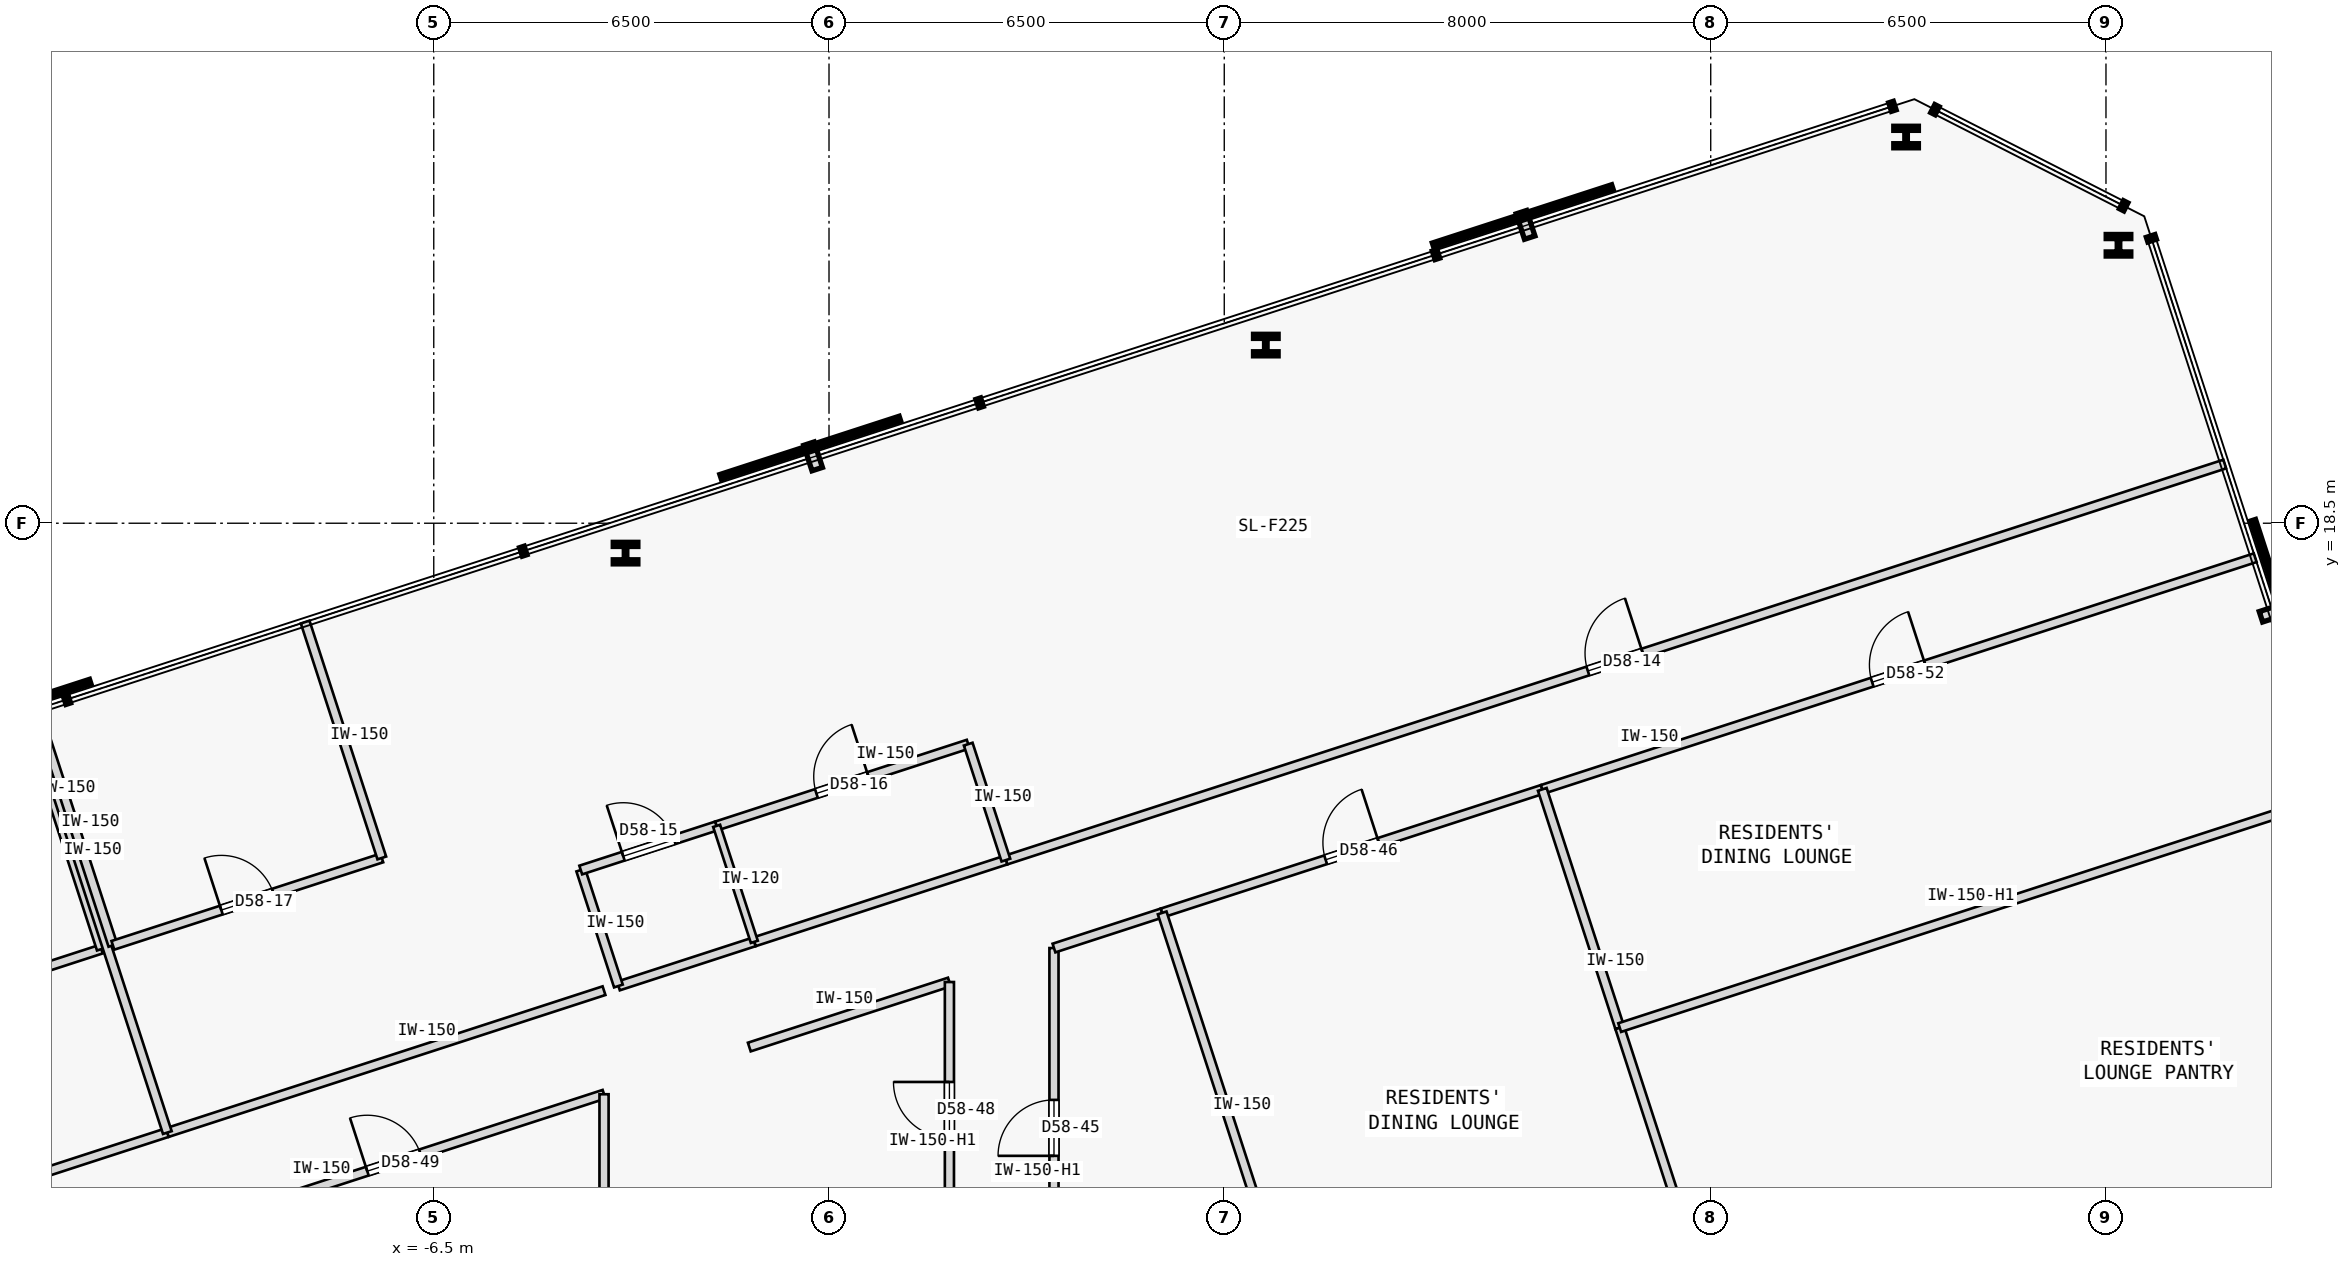
"""IFC4 building model, lengths in metres.
Left out: names, types, materials, properties, quantities, classifications, styles, units other than length and angle.
Written with IfcOpenShell. Run it as: python <this file> out.ifc"""

import sys

from ifc_helpers import new_model, si_unit, direction, frame, frame_2d, origin, origin_2d, place, context, subcontext, project, spatial, rectangle, i_section, extrude, element, fill, save


model = new_model("IFC4")
c1 = context("Model", 3, precision=1e-05, world=origin(), true_north=direction((0.0, 1.0)))
c2 = subcontext(c1, "Body", "Model", "MODEL_VIEW")
j1 = project(units=[si_unit("LENGTHUNIT", "METRE"), si_unit("PLANEANGLEUNIT", "RADIAN")], contexts=[c1])
p1 = place(None, origin())
s1 = spatial("IfcSite", under=j1, at=p1, CompositionType="ELEMENT")
p2 = place(p1, origin())
s2 = spatial("IfcBuilding", under=s1, at=p2, CompositionType="ELEMENT")
p3 = place(p2, frame((0.0, 0.0, 220.95)))
s3 = spatial("IfcBuildingStorey", under=s2, at=p3, CompositionType="ELEMENT", Elevation=220.95)
for number, where, z_axis, x_axis in (
    (1, (21.206, 23.071, 0.0), (0.0, 0.0, 1.0), (1.0, 0.0, 0.0)),
    (2, (17.713, 24.851, 0.0), (0.0, 0.0, 1.0), (1.0, 0.0, 0.0)),
    (3, (7.184, 21.43, 0.0), (0.0, 0.0, 1.0), (1.0, 0.0, 0.0)),
    (4, (-3.346, 18.009, 0.0), (0.0, 0.0, 1.0), (1.0, 0.0, 0.0)),
):
    element("IfcColumn", number, at=place(p3, frame(where, z_axis=z_axis, x_axis=x_axis)), inside=s3, PredefinedType="COLUMN", context=c2, shape_type="SweptSolid", body=[
        extrude(i_section(OverallWidth=0.405, OverallDepth=0.355, WebThickness=0.042, FlangeThickness=0.068, FilletRadius=0.015, at=origin_2d()), origin(), (0.0, 0.0, 1.0), 3.35),
    ])
p4 = place(p3, frame((-24.022, 4.21, 0.0), z_axis=(0.0, 0.0, 1.0), x_axis=(0.951058997127, 0.309009359055, 0.0)))
e5 = element("IfcWall", 5, at=p4, inside=s3, PredefinedType="PARTITIONING", context=c2, shape_type="SweptSolid", body=[
    extrude(rectangle(XDim=13.817, YDim=0.15, at=frame_2d((6.908, 0.0))), origin(), (0.0, 0.0, 1.0), 3.125),
])
p5 = place(p4, frame((6.434, 0.0, 0.0)))
e6 = element("IfcOpeningElement", 6, at=p5, cuts=e5, PredefinedType="OPENING", context=c2, shape_type="SweptSolid", body=[
    extrude(rectangle(XDim=0.95, YDim=2.15, at=frame_2d((0.475, 1.075))), frame((0.0, 0.085, 0.0), z_axis=(0.0, -1.0, 0.0), x_axis=(1.0, 0.0, 0.0)), (0.0, 0.0, 1.0), 0.17),
])
p6 = place(p3, frame((-10.882, 8.479, 0.0), z_axis=(0.0, 0.0, 1.0), x_axis=(0.951051887333, 0.309031240494, 0.0)))
e7 = element("IfcWall", 7, at=p6, inside=s3, PredefinedType="PARTITIONING", context=c2, shape_type="SweptSolid", body=[
    extrude(rectangle(XDim=7.551, YDim=0.15, at=frame_2d((3.775, 0.0))), origin(), (0.0, 0.0, 1.0), 3.125),
])
p7 = place(p3, frame((2.909, 12.96, 0.0), z_axis=(0.0, 0.0, 1.0), x_axis=(0.951056113966, 0.309018232614, 0.0)))
e8 = element("IfcWall", 8, at=p7, inside=s3, PredefinedType="PARTITIONING", context=c2, shape_type="SweptSolid", body=[
    extrude(rectangle(XDim=21.076, YDim=0.15, at=frame_2d((10.538, 0.0))), origin(), (0.0, 0.0, 1.0), 3.125),
])
p8 = place(p7, frame((10.063, 0.0, 0.0)))
e9 = element("IfcOpeningElement", 9, at=p8, cuts=e8, PredefinedType="OPENING", context=c2, shape_type="SweptSolid", body=[
    extrude(rectangle(XDim=0.95, YDim=2.15, at=frame_2d((0.475, 1.075))), frame((0.0, 0.085, 0.0), z_axis=(0.0, -1.0, 0.0), x_axis=(1.0, 0.0, 0.0)), (0.0, 0.0, 1.0), 0.17),
])
p9 = place(p3, frame((-3.463, 10.89, 0.0), z_axis=(0.0, 0.0, 1.0), x_axis=(0.951045519245, 0.309050837767, 0.0)))
e10 = element("IfcWall", 10, at=p9, inside=s3, PredefinedType="PARTITIONING", context=c2, shape_type="SweptSolid", body=[
    extrude(rectangle(XDim=2.35, YDim=0.15, at=frame_2d((1.175, 0.0))), origin(), (0.0, 0.0, 1.0), 3.125),
])
p10 = place(p3, frame((-1.228, 11.616, 0.0), z_axis=(0.0, 0.0, 1.0), x_axis=(0.951069122051, 0.308978195154, 0.0)))
e11 = element("IfcWall", 11, at=p10, inside=s3, PredefinedType="PARTITIONING", context=c2, shape_type="SweptSolid", body=[
    extrude(rectangle(XDim=4.35, YDim=0.15, at=frame_2d((2.175, 0.0))), origin(), (0.0, 0.0, 1.0), 3.125),
])
p11 = place(p3, frame((3.7, 5.6, 0.0), z_axis=(0.0, 0.0, 1.0), x_axis=(-0.000123839008, 0.999999992332, 0.0)))
e12 = element("IfcWall", 12, at=p11, inside=s3, PredefinedType="PARTITIONING", context=c2, shape_type="SweptSolid", body=[
    extrude(rectangle(XDim=5.914, YDim=0.15, at=frame_2d((2.957, 0.0))), origin(), (0.0, 0.0, 1.0), 2.675),
])
p12 = place(p11, frame((2.497, 0.0, 0.0)))
e13 = element("IfcOpeningElement", 13, at=p12, cuts=e12, PredefinedType="OPENING", context=c2, shape_type="SweptSolid", body=[
    extrude(rectangle(XDim=0.92, YDim=2.15, at=frame_2d((0.46, 1.075))), frame((0.0, 0.085, 0.0), z_axis=(0.0, -1.0, 0.0), x_axis=(1.0, 0.0, 0.0)), (0.0, 0.0, 1.0), 0.17),
])
p13 = place(p3, frame((3.699, 11.514, 0.0), z_axis=(0.0, 0.0, 1.0), x_axis=(0.951069540665, 0.308976906612, 0.0)))
e14 = element("IfcWall", 14, at=p13, inside=s3, PredefinedType="PARTITIONING", context=c2, shape_type="SweptSolid", body=[
    extrude(rectangle(XDim=1.871, YDim=0.15, at=frame_2d((0.936, 0.0))), origin(), (0.0, 0.0, 1.0), 3.125),
])
p14 = place(p3, frame((5.479, 12.092, 0.0), z_axis=(0.0, 0.0, 1.0), x_axis=(0.951051809397, 0.309031480343, 0.0)))
e15 = element("IfcWall", 15, at=p14, inside=s3, PredefinedType="PARTITIONING", context=c2, shape_type="SweptSolid", body=[
    extrude(rectangle(XDim=6.573, YDim=0.15, at=frame_2d((3.287, 0.0))), origin(), (0.0, 0.0, 1.0), 3.125),
])
p15 = place(p14, frame((2.826, 0.0, 0.0)))
e16 = element("IfcOpeningElement", 16, at=p15, cuts=e15, PredefinedType="OPENING", context=c2, shape_type="SweptSolid", body=[
    extrude(rectangle(XDim=0.92, YDim=2.15, at=frame_2d((0.46, 1.075))), frame((0.0, 0.085, 0.0), z_axis=(0.0, -1.0, 0.0), x_axis=(1.0, 0.0, 0.0)), (0.0, 0.0, 1.0), 0.17),
])
p16 = place(p3, frame((-1.311, 9.886, 0.0), z_axis=(0.0, 0.0, 1.0), x_axis=(0.951068803905, 0.308979174442, 0.0)))
e17 = element("IfcWall", 17, at=p16, inside=s3, PredefinedType="PARTITIONING", context=c2, shape_type="SweptSolid", body=[
    extrude(rectangle(XDim=3.46, YDim=0.15, at=frame_2d((1.73, 0.0))), origin(), (0.0, 0.0, 1.0), 3.125),
])
p17 = place(p3, frame((1.98, 6.748, 0.0), z_axis=(0.0, 0.0, 1.0), x_axis=(0.0, 1.0, 0.0)))
e18 = element("IfcWall", 18, at=p17, inside=s3, PredefinedType="PARTITIONING", context=c2, shape_type="SweptSolid", body=[
    extrude(rectangle(XDim=4.207, YDim=0.15, at=frame_2d((2.104, 0.0))), origin(), (0.0, 0.0, 1.0), 2.675),
])
p18 = place(p17, frame((1.643, 0.0, 0.0)))
e19 = element("IfcOpeningElement", 19, at=p18, cuts=e18, PredefinedType="OPENING", context=c2, shape_type="SweptSolid", body=[
    extrude(rectangle(XDim=0.92, YDim=2.15, at=frame_2d((0.46, 1.075))), frame((0.0, 0.085, 0.0), z_axis=(0.0, -1.0, 0.0), x_axis=(1.0, 0.0, 0.0)), (0.0, 0.0, 1.0), 0.17),
])
p19 = place(p3, frame((-10.612, 6.864, 0.0), z_axis=(0.0, 0.0, 1.0), x_axis=(0.951060972078, 0.309003280548, 0.0)))
e20 = element("IfcWall", 20, at=p19, inside=s3, PredefinedType="PARTITIONING", context=c2, shape_type="SweptSolid", body=[
    extrude(rectangle(XDim=7.268, YDim=0.15, at=frame_2d((3.634, 0.0))), origin(), (0.0, 0.0, 1.0), 3.125),
])
p20 = place(p19, frame((3.174, 0.0, 0.0)))
e21 = element("IfcOpeningElement", 21, at=p20, cuts=e20, PredefinedType="OPENING", context=c2, shape_type="SweptSolid", body=[
    extrude(rectangle(XDim=0.92, YDim=2.15, at=frame_2d((0.46, 1.075))), frame((0.0, 0.085, 0.0), z_axis=(0.0, -1.0, 0.0), x_axis=(1.0, 0.0, 0.0)), (0.0, 0.0, 1.0), 0.17),
])
p21 = place(p3, frame((-3.7, 5.6, 0.0), z_axis=(0.0, 0.0, 1.0), x_axis=(0.000139120755, 0.999999990323, 0.0)))
e22 = element("IfcWall", 22, at=p21, inside=s3, PredefinedType="PARTITIONING", context=c2, shape_type="SweptSolid", body=[
    extrude(rectangle(XDim=3.51, YDim=0.15, at=frame_2d((1.755, 0.0))), origin(), (0.0, 0.0, 1.0), 3.125),
])
p22 = place(p3, frame((11.73, 14.123, 0.0), z_axis=(0.0, 0.0, 1.0), x_axis=(0.951060263663, 0.309005460926, 0.0)))
e23 = element("IfcWall", 23, at=p22, inside=s3, PredefinedType="PARTITIONING", context=c2, shape_type="SweptSolid", body=[
    extrude(rectangle(XDim=12.327, YDim=0.15, at=frame_2d((6.164, 0.0))), origin(), (0.0, 0.0, 1.0), 3.125),
])
p23 = place(p22, frame((5.704, 0.0, 0.0)))
e24 = element("IfcOpeningElement", 24, at=p23, cuts=e23, PredefinedType="OPENING", context=c2, shape_type="SweptSolid", body=[
    extrude(rectangle(XDim=0.92, YDim=2.15, at=frame_2d((0.46, 1.075))), frame((0.0, 0.085, 0.0), z_axis=(0.0, -1.0, 0.0), x_axis=(1.0, 0.0, 0.0)), (0.0, 0.0, 1.0), 0.17),
])
p24 = place(p3, frame((-16.389, 10.06, 0.0), z_axis=(0.0, 0.0, 1.0), x_axis=(0.951050272606, 0.309036209813, 0.0)))
e25 = element("IfcWall", 25, at=p24, inside=s3, PredefinedType="PARTITIONING", context=c2, shape_type="SweptSolid", body=[
    extrude(rectangle(XDim=4.65, YDim=0.15, at=frame_2d((2.325, 0.0))), origin(), (0.0, 0.0, 1.0), 3.125),
])
p25 = place(p24, frame((1.875, 0.0, 0.0)))
e26 = element("IfcOpeningElement", 26, at=p25, cuts=e25, PredefinedType="OPENING", context=c2, shape_type="SweptSolid", body=[
    extrude(rectangle(XDim=0.9, YDim=2.15, at=frame_2d((0.45, 1.075))), frame((0.0, 0.085, 0.0), z_axis=(0.0, -1.0, 0.0), x_axis=(1.0, 0.0, 0.0)), (0.0, 0.0, 1.0), 0.17),
])
p26 = place(p3, frame((-11.967, 11.497, 0.0), z_axis=(0.0, 0.0, 1.0), x_axis=(-0.309018403393, 0.951056058476, 0.0)))
e27 = element("IfcWall", 27, at=p26, inside=s3, PredefinedType="PARTITIONING", context=c2, shape_type="SweptSolid", body=[
    extrude(rectangle(XDim=4.079, YDim=0.15, at=frame_2d((2.04, 0.0))), origin(), (0.0, 0.0, 1.0), 3.125),
])
p27 = place(p3, frame((-10.882, 8.479, 0.0), z_axis=(0.0, 0.0, 1.0), x_axis=(-0.308998913866, 0.951062390819, 0.0)))
e28 = element("IfcWall", 28, at=p27, inside=s3, PredefinedType="PARTITIONING", context=c2, shape_type="SweptSolid", body=[
    extrude(rectangle(XDim=7.284, YDim=0.15, at=frame_2d((3.642, 0.0))), origin(), (0.0, 0.0, 1.0), 3.125),
])
p28 = place(p3, frame((-3.463, 10.89, 0.0), z_axis=(0.0, 0.0, 1.0), x_axis=(-0.308912611775, 0.951090425925, 0.0)))
e29 = element("IfcWall", 29, at=p28, inside=s3, PredefinedType="PARTITIONING", context=c2, shape_type="SweptSolid", body=[
    extrude(rectangle(XDim=2.005, YDim=0.15, at=frame_2d((1.002, 0.0))), origin(), (0.0, 0.0, 1.0), 3.125),
])
p29 = place(p3, frame((-4.083, 12.797, 0.0), z_axis=(0.0, 0.0, 1.0), x_axis=(0.951066131077, 0.308987401554, 0.0)))
e30 = element("IfcWall", 30, at=p29, inside=s3, PredefinedType="PARTITIONING", context=c2, shape_type="SweptSolid", body=[
    extrude(rectangle(XDim=2.35, YDim=0.15, at=frame_2d((1.175, 0.0))), origin(), (0.0, 0.0, 1.0), 3.125),
])
p30 = place(p29, frame((0.735, 0.0, 0.0)))
e31 = element("IfcOpeningElement", 31, at=p30, cuts=e30, PredefinedType="OPENING", context=c2, shape_type="SweptSolid", body=[
    extrude(rectangle(XDim=0.88, YDim=2.15, at=frame_2d((0.44, 1.075))), frame((0.0, 0.085, 0.0), z_axis=(0.0, -1.0, 0.0), x_axis=(1.0, 0.0, 0.0)), (0.0, 0.0, 1.0), 0.17),
])
p31 = place(p3, frame((-1.848, 13.523, 0.0), z_axis=(0.0, 0.0, 1.0), x_axis=(0.951057987102, 0.309012467661, 0.0)))
e32 = element("IfcWall", 32, at=p31, inside=s3, PredefinedType="PARTITIONING", context=c2, shape_type="SweptSolid", body=[
    extrude(rectangle(XDim=4.35, YDim=0.15, at=frame_2d((2.175, 0.0))), origin(), (0.0, 0.0, 1.0), 3.125),
])
p32 = place(p31, frame((1.725, 0.0, 0.0)))
e33 = element("IfcOpeningElement", 33, at=p32, cuts=e32, PredefinedType="OPENING", context=c2, shape_type="SweptSolid", body=[
    extrude(rectangle(XDim=0.9, YDim=2.15, at=frame_2d((0.45, 1.075))), frame((0.0, 0.085, 0.0), z_axis=(0.0, -1.0, 0.0), x_axis=(1.0, 0.0, 0.0)), (0.0, 0.0, 1.0), 0.17),
])
p33 = place(p3, frame((2.909, 12.96, 0.0), z_axis=(0.0, 0.0, 1.0), x_axis=(-0.308912611775, 0.951090425925, 0.0)))
e34 = element("IfcWall", 34, at=p33, inside=s3, PredefinedType="PARTITIONING", context=c2, shape_type="SweptSolid", body=[
    extrude(rectangle(XDim=2.005, YDim=0.15, at=frame_2d((1.002, 0.0))), origin(), (0.0, 0.0, 1.0), 3.125),
])
p34 = place(p3, frame((-11.777, 11.559, 0.0), z_axis=(0.0, 0.0, 1.0), x_axis=(-0.309018403393, 0.951056058476, 0.0)))
e35 = element("IfcWall", 35, at=p34, inside=s3, PredefinedType="PARTITIONING", context=c2, shape_type="SweptSolid", body=[
    extrude(rectangle(XDim=4.079, YDim=0.15, at=frame_2d((2.04, 0.0))), origin(), (0.0, 0.0, 1.0), 3.125),
])
p35 = place(p3, frame((-11.777, 11.559, 0.0), z_axis=(0.0, 0.0, 1.0), x_axis=(0.951050272606, 0.309036209813, 0.0)))
e36 = element("IfcWall", 36, at=p35, inside=s3, PredefinedType="PARTITIONING", context=c2, shape_type="SweptSolid", body=[
    extrude(rectangle(XDim=4.65, YDim=0.15, at=frame_2d((2.325, 0.0))), origin(), (0.0, 0.0, 1.0), 3.125),
])
p36 = place(p35, frame((1.875, 0.0, 0.0)))
e37 = element("IfcOpeningElement", 37, at=p36, cuts=e36, PredefinedType="OPENING", context=c2, shape_type="SweptSolid", body=[
    extrude(rectangle(XDim=0.9, YDim=2.15, at=frame_2d((0.45, 1.075))), frame((0.0, 0.085, 0.0), z_axis=(0.0, -1.0, 0.0), x_axis=(1.0, 0.0, 0.0)), (0.0, 0.0, 1.0), 0.17),
])
p37 = place(p3, frame((-7.354, 12.996, 0.0), z_axis=(0.0, 0.0, 1.0), x_axis=(-0.309018403393, 0.951056058476, 0.0)))
e38 = element("IfcWall", 38, at=p37, inside=s3, PredefinedType="PARTITIONING", context=c2, shape_type="SweptSolid", body=[
    extrude(rectangle(XDim=4.079, YDim=0.15, at=frame_2d((2.04, 0.0))), origin(), (0.0, 0.0, 1.0), 3.125),
])
p38 = place(p3, frame((-1.228, 11.616, 0.0), z_axis=(0.0, 0.0, 1.0), x_axis=(-0.309058537449, 0.951043017129, 0.0)))
e39 = element("IfcWall", 39, at=p38, inside=s3, PredefinedType="PARTITIONING", context=c2, shape_type="SweptSolid", body=[
    extrude(rectangle(XDim=2.005, YDim=0.12, at=frame_2d((1.002, 0.0))), origin(), (0.0, 0.0, 1.0), 3.125),
])
p39 = place(p3, frame((7.588, 5.6, 0.0), z_axis=(0.0, 0.0, 1.0), x_axis=(-0.309018946982, 0.951055881852, 0.0)))
e40 = element("IfcWall", 40, at=p39, inside=s3, PredefinedType="PARTITIONING", context=c2, shape_type="SweptSolid", body=[
    extrude(rectangle(XDim=6.826, YDim=0.15, at=frame_2d((3.413, 0.0))), origin(), (0.0, 0.0, 1.0), 3.125),
])
p40 = place(p3, frame((14.5, 5.6, 0.0), z_axis=(0.0, 0.0, 1.0), x_axis=(-0.308974360462, 0.951070367837, 0.0)))
e41 = element("IfcWall", 41, at=p40, inside=s3, PredefinedType="PARTITIONING", context=c2, shape_type="SweptSolid", body=[
    extrude(rectangle(XDim=4.843, YDim=0.15, at=frame_2d((2.421, 0.0))), origin(), (0.0, 0.0, 1.0), 3.125),
])
p41 = place(p3, frame((13.003, 10.206, 0.0), z_axis=(0.0, 0.0, 1.0), x_axis=(-0.309035144366, 0.951050618814, 0.0)))
e42 = element("IfcWall", 42, at=p41, inside=s3, PredefinedType="PARTITIONING", context=c2, shape_type="SweptSolid", body=[
    extrude(rectangle(XDim=4.119, YDim=0.15, at=frame_2d((2.06, 0.0))), origin(), (0.0, 0.0, 1.0), 3.125),
])
p42 = place(p3, frame((13.003, 10.206, 0.0), z_axis=(0.0, 0.0, 1.0), x_axis=(0.951060263663, 0.309005460926, 0.0)))
e43 = element("IfcWall", 43, at=p42, inside=s3, PredefinedType="PARTITIONING", context=c2, shape_type="SweptSolid", body=[
    extrude(rectangle(XDim=12.327, YDim=0.15, at=frame_2d((6.164, 0.0))), origin(), (0.0, 0.0, 1.0), 2.675),
])
p43 = place(p8, origin())
e44 = element("IfcDoor", 44, at=p43, inside=s3, OperationType="SINGLE_SWING_RIGHT", PredefinedType="DOOR", context=c2, shape_type="SweptSolid", body=[
    extrude(rectangle(XDim=0.95, YDim=2.15, at=frame_2d((0.475, 1.075))), frame((0.0, 0.025, 0.0), z_axis=(0.0, -1.0, 0.0), x_axis=(1.0, 0.0, 0.0)), (0.0, 0.0, 1.0), 0.05),
])
fill(e9, e44)
p44 = place(p30, origin())
e45 = element("IfcDoor", 45, at=p44, inside=s3, OperationType="SINGLE_SWING_LEFT", PredefinedType="DOOR", context=c2, shape_type="SweptSolid", body=[
    extrude(rectangle(XDim=0.88, YDim=2.15, at=frame_2d((0.44, 1.075))), frame((0.0, 0.025, 0.0), z_axis=(0.0, -1.0, 0.0), x_axis=(1.0, 0.0, 0.0)), (0.0, 0.0, 1.0), 0.05),
])
fill(e31, e45)
p45 = place(p32, origin())
e46 = element("IfcDoor", 46, at=p45, inside=s3, OperationType="SINGLE_SWING_RIGHT", PredefinedType="DOOR", context=c2, shape_type="SweptSolid", body=[
    extrude(rectangle(XDim=0.9, YDim=2.15, at=frame_2d((0.45, 1.075))), frame((0.0, 0.025, 0.0), z_axis=(0.0, -1.0, 0.0), x_axis=(1.0, 0.0, 0.0)), (0.0, 0.0, 1.0), 0.05),
])
fill(e33, e46)
p46 = place(p36, origin())
e47 = element("IfcDoor", 47, at=p46, inside=s3, OperationType="SINGLE_SWING_LEFT", PredefinedType="DOOR", context=c2, shape_type="SweptSolid", body=[
    extrude(rectangle(XDim=0.9, YDim=2.15, at=frame_2d((0.45, 1.075))), frame((0.0, 0.025, 0.0), z_axis=(0.0, -1.0, 0.0), x_axis=(1.0, 0.0, 0.0)), (0.0, 0.0, 1.0), 0.05),
])
fill(e37, e47)
p47 = place(p12, origin())
e48 = element("IfcDoor", 48, at=p47, inside=s3, OperationType="SINGLE_SWING_LEFT", PredefinedType="DOOR", context=c2, shape_type="SweptSolid", body=[
    extrude(rectangle(XDim=0.92, YDim=2.15, at=frame_2d((0.46, 1.075))), frame((0.0, 0.025, 0.0), z_axis=(0.0, -1.0, 0.0), x_axis=(1.0, 0.0, 0.0)), (0.0, 0.0, 1.0), 0.05),
])
fill(e13, e48)
p48 = place(p15, origin())
e49 = element("IfcDoor", 49, at=p48, inside=s3, OperationType="SINGLE_SWING_RIGHT", PredefinedType="DOOR", context=c2, shape_type="SweptSolid", body=[
    extrude(rectangle(XDim=0.92, YDim=2.15, at=frame_2d((0.46, 1.075))), frame((0.0, 0.025, 0.0), z_axis=(0.0, -1.0, 0.0), x_axis=(1.0, 0.0, 0.0)), (0.0, 0.0, 1.0), 0.05),
])
fill(e16, e49)
p49 = place(p18, origin())
e50 = element("IfcDoor", 50, at=p49, inside=s3, OperationType="SINGLE_SWING_RIGHT", PredefinedType="DOOR", context=c2, shape_type="SweptSolid", body=[
    extrude(rectangle(XDim=0.92, YDim=2.15, at=frame_2d((0.46, 1.075))), frame((0.0, 0.025, 0.0), z_axis=(0.0, -1.0, 0.0), x_axis=(1.0, 0.0, 0.0)), (0.0, 0.0, 1.0), 0.05),
])
fill(e19, e50)
p50 = place(p20, origin())
e51 = element("IfcDoor", 51, at=p50, inside=s3, OperationType="SINGLE_SWING_LEFT", PredefinedType="DOOR", context=c2, shape_type="SweptSolid", body=[
    extrude(rectangle(XDim=0.92, YDim=2.15, at=frame_2d((0.46, 1.075))), frame((0.0, 0.025, 0.0), z_axis=(0.0, -1.0, 0.0), x_axis=(1.0, 0.0, 0.0)), (0.0, 0.0, 1.0), 0.05),
])
fill(e21, e51)
p51 = place(p23, origin())
e52 = element("IfcDoor", 52, at=p51, inside=s3, OperationType="SINGLE_SWING_RIGHT", PredefinedType="DOOR", context=c2, shape_type="SweptSolid", body=[
    extrude(rectangle(XDim=0.92, YDim=2.15, at=frame_2d((0.46, 1.075))), frame((0.0, 0.025, 0.0), z_axis=(0.0, -1.0, 0.0), x_axis=(1.0, 0.0, 0.0)), (0.0, 0.0, 1.0), 0.05),
])
fill(e24, e52)
save(model, sys.argv[1])
